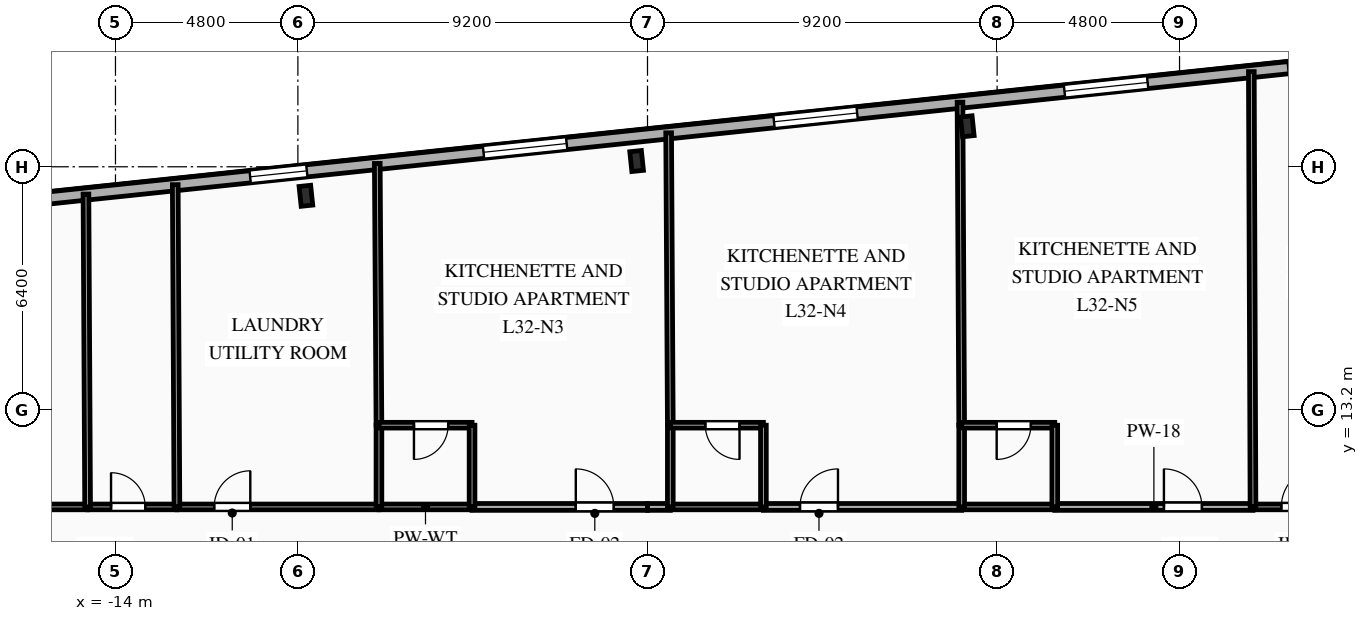
"""IFC4 building model, lengths in metres.
Left out: names, types, materials, properties, quantities, classifications, styles, units other than length and angle.
Written with IfcOpenShell. Run it as: python <this file> out.ifc"""

import sys

from ifc_helpers import new_model, si_unit, direction, frame, frame_2d, origin, origin_2d, place, context, subcontext, project, spatial, rectangle, i_section, extrude, element, fill, save


model = new_model("IFC4")
c1 = context("Model", 3, precision=1e-05, world=origin(), true_north=direction((0.0, 1.0)))
c2 = subcontext(c1, "Body", "Model", "MODEL_VIEW")
j1 = project(units=[si_unit("LENGTHUNIT", "METRE"), si_unit("PLANEANGLEUNIT", "RADIAN")], contexts=[c1])
p1 = place(None, origin())
s1 = spatial("IfcSite", under=j1, at=p1, CompositionType="ELEMENT")
p2 = place(p1, origin())
s2 = spatial("IfcBuilding", under=s1, at=p2, CompositionType="ELEMENT")
p3 = place(p2, frame((0.0, 0.0, 115.85)))
s3 = spatial("IfcBuildingStorey", under=s2, at=p3, CompositionType="ELEMENT", Elevation=115.85)
for number, where, z_axis, x_axis in (
    (1, (8.415, 20.666, 0.0), (0.0, 0.0, 1.0), (0.995, 0.105, 0.0)),
    (2, (-0.287, 19.751, 0.0), (0.0, 0.0, 1.0), (0.995, 0.105, 0.0)),
    (3, (-8.989, 18.836, 0.0), (0.0, 0.0, 1.0), (0.995, 0.105, 0.0)),
):
    element("IfcColumn", number, at=place(p3, frame(where, z_axis=z_axis, x_axis=x_axis)), inside=s3, PredefinedType="COLUMN", context=c2, shape_type="SweptSolid", body=[
        extrude(i_section(OverallWidth=0.306, OverallDepth=0.524, WebThickness=0.021, FlangeThickness=0.04, FilletRadius=0.027, at=origin_2d()), origin(), (0.0, 0.0, 1.0), 3.35),
    ])
p4 = place(p3, frame((-27.107, 17.586, 0.0), z_axis=(0.0, 0.0, 1.0), x_axis=(0.994521628355, 0.104531003701, 0.0)))
e4 = element("IfcWall", 4, at=p4, inside=s3, PredefinedType="SOLIDWALL", context=c2, shape_type="SweptSolid", body=[
    extrude(rectangle(XDim=53.8, YDim=0.32, at=frame_2d((26.9, 0.0))), origin(), (0.0, 0.0, 1.0), 3.045),
])
p5 = place(p4, frame((1.457, 0.0, 0.85)))
e5 = element("IfcOpeningElement", 5, at=p5, cuts=e4, PredefinedType="OPENING", context=c2, shape_type="SweptSolid", body=[
    extrude(rectangle(XDim=1.65, YDim=1.85, at=frame_2d((0.825, 0.925))), frame((0.0, 0.17, 0.0), z_axis=(0.0, -1.0, 0.0), x_axis=(1.0, 0.0, 0.0)), (0.0, 0.0, 1.0), 0.34),
])
p6 = place(p4, frame((7.421, 0.0, 0.85)))
e6 = element("IfcOpeningElement", 6, at=p6, cuts=e4, PredefinedType="OPENING", context=c2, shape_type="SweptSolid", body=[
    extrude(rectangle(XDim=1.65, YDim=1.85, at=frame_2d((0.825, 0.925))), frame((0.0, 0.17, 0.0), z_axis=(0.0, -1.0, 0.0), x_axis=(1.0, 0.0, 0.0)), (0.0, 0.0, 1.0), 0.34),
])
p7 = place(p4, frame((16.743, 0.0, 0.85)))
e7 = element("IfcOpeningElement", 7, at=p7, cuts=e4, PredefinedType="OPENING", context=c2, shape_type="SweptSolid", body=[
    extrude(rectangle(XDim=1.5, YDim=1.85, at=frame_2d((0.75, 0.925))), frame((0.0, 0.17, 0.0), z_axis=(0.0, -1.0, 0.0), x_axis=(1.0, 0.0, 0.0)), (0.0, 0.0, 1.0), 0.34),
])
p8 = place(p4, frame((22.918, 0.0, 0.85)))
e8 = element("IfcOpeningElement", 8, at=p8, cuts=e4, PredefinedType="OPENING", context=c2, shape_type="SweptSolid", body=[
    extrude(rectangle(XDim=2.2, YDim=1.85, at=frame_2d((1.1, 0.925))), frame((0.0, 0.17, 0.0), z_axis=(0.0, -1.0, 0.0), x_axis=(1.0, 0.0, 0.0)), (0.0, 0.0, 1.0), 0.34),
])
p9 = place(p4, frame((30.604, 0.0, 0.85)))
e9 = element("IfcOpeningElement", 9, at=p9, cuts=e4, PredefinedType="OPENING", context=c2, shape_type="SweptSolid", body=[
    extrude(rectangle(XDim=2.2, YDim=1.85, at=frame_2d((1.1, 0.925))), frame((0.0, 0.17, 0.0), z_axis=(0.0, -1.0, 0.0), x_axis=(1.0, 0.0, 0.0)), (0.0, 0.0, 1.0), 0.34),
])
p10 = place(p4, frame((38.289, 0.0, 0.85)))
e10 = element("IfcOpeningElement", 10, at=p10, cuts=e4, PredefinedType="OPENING", context=c2, shape_type="SweptSolid", body=[
    extrude(rectangle(XDim=2.2, YDim=1.85, at=frame_2d((1.1, 0.925))), frame((0.0, 0.17, 0.0), z_axis=(0.0, -1.0, 0.0), x_axis=(1.0, 0.0, 0.0)), (0.0, 0.0, 1.0), 0.34),
])
p11 = place(p4, frame((44.208, 0.0, 0.85)))
e11 = element("IfcOpeningElement", 11, at=p11, cuts=e4, PredefinedType="OPENING", context=c2, shape_type="SweptSolid", body=[
    extrude(rectangle(XDim=1.65, YDim=1.85, at=frame_2d((0.825, 0.925))), frame((0.0, 0.17, 0.0), z_axis=(0.0, -1.0, 0.0), x_axis=(1.0, 0.0, 0.0)), (0.0, 0.0, 1.0), 0.34),
])
p12 = place(p4, frame((47.771, 0.0, 0.85)))
e12 = element("IfcOpeningElement", 12, at=p12, cuts=e4, PredefinedType="OPENING", context=c2, shape_type="SweptSolid", body=[
    extrude(rectangle(XDim=1.65, YDim=1.85, at=frame_2d((0.825, 0.925))), frame((0.0, 0.17, 0.0), z_axis=(0.0, -1.0, 0.0), x_axis=(1.0, 0.0, 0.0)), (0.0, 0.0, 1.0), 0.34),
])
p13 = place(p4, frame((51.129, 0.0, 0.85)))
e13 = element("IfcOpeningElement", 13, at=p13, cuts=e4, PredefinedType="OPENING", context=c2, shape_type="SweptSolid", body=[
    extrude(rectangle(XDim=1.5, YDim=1.85, at=frame_2d((0.75, 0.925))), frame((0.0, 0.17, 0.0), z_axis=(0.0, -1.0, 0.0), x_axis=(1.0, 0.0, 0.0)), (0.0, 0.0, 1.0), 0.34),
])
p14 = place(p3, frame((-23.0, 10.65, 0.0), z_axis=(0.0, 0.0, 1.0), x_axis=(1.0, 0.0, 0.0)))
e14 = element("IfcWall", 14, at=p14, inside=s3, PredefinedType="PARTITIONING", context=c2, shape_type="SweptSolid", body=[
    extrude(rectangle(XDim=8.267, YDim=0.15, at=frame_2d((4.134, 0.0))), origin(), (0.0, 0.0, 1.0), 3.045),
])
p15 = place(p14, frame((1.337, 0.0, 0.0)))
e15 = element("IfcOpeningElement", 15, at=p15, cuts=e14, PredefinedType="OPENING", context=c2, shape_type="SweptSolid", body=[
    extrude(rectangle(XDim=1.05, YDim=2.15, at=frame_2d((0.525, 1.075))), frame((0.0, 0.085, 0.0), z_axis=(0.0, -1.0, 0.0), x_axis=(1.0, 0.0, 0.0)), (0.0, 0.0, 1.0), 0.17),
])
p16 = place(p3, frame((-14.733, 10.65, 0.0), z_axis=(0.0, 0.0, 1.0), x_axis=(1.0, 0.0, 0.0)))
e16 = element("IfcWall", 16, at=p16, inside=s3, PredefinedType="PLUMBINGWALL", context=c2, shape_type="SweptSolid", body=[
    extrude(rectangle(XDim=2.35, YDim=0.15, at=frame_2d((1.175, 0.0))), origin(), (0.0, 0.0, 1.0), 3.045),
])
p17 = place(p16, frame((0.616, 0.0, 0.0)))
e17 = element("IfcOpeningElement", 17, at=p17, cuts=e16, PredefinedType="OPENING", context=c2, shape_type="SweptSolid", body=[
    extrude(rectangle(XDim=0.9, YDim=2.1, at=frame_2d((0.45, 1.05))), frame((0.0, 0.085, 0.0), z_axis=(0.0, -1.0, 0.0), x_axis=(1.0, 0.0, 0.0)), (0.0, 0.0, 1.0), 0.17),
])
p18 = place(p3, frame((-12.383, 10.65, 0.0), z_axis=(0.0, 0.0, 1.0), x_axis=(1.0, 0.0, 0.0)))
e18 = element("IfcWall", 18, at=p18, inside=s3, PredefinedType="PARTITIONING", context=c2, shape_type="SweptSolid", body=[
    extrude(rectangle(XDim=5.316, YDim=0.15, at=frame_2d((2.658, 0.0))), origin(), (0.0, 0.0, 1.0), 3.045),
])
p19 = place(p18, frame((0.981, 0.0, 0.0)))
e19 = element("IfcOpeningElement", 19, at=p19, cuts=e18, PredefinedType="OPENING", context=c2, shape_type="SweptSolid", body=[
    extrude(rectangle(XDim=0.95, YDim=2.1, at=frame_2d((0.475, 1.05))), frame((0.0, 0.085, 0.0), z_axis=(0.0, -1.0, 0.0), x_axis=(1.0, 0.0, 0.0)), (0.0, 0.0, 1.0), 0.17),
])
p20 = place(p3, frame((-4.617, 10.65, 0.0), z_axis=(0.0, 0.0, 1.0), x_axis=(1.0, 0.0, 0.0)))
e20 = element("IfcWall", 20, at=p20, inside=s3, PredefinedType="PARTITIONING", context=c2, shape_type="SweptSolid", body=[
    extrude(rectangle(XDim=4.617, YDim=0.18, at=frame_2d((2.309, 0.0))), origin(), (0.0, 0.0, 1.0), 3.045),
])
p21 = place(p20, frame((2.73, 0.0, 0.0)))
e21 = element("IfcOpeningElement", 21, at=p21, cuts=e20, PredefinedType="OPENING", context=c2, shape_type="SweptSolid", body=[
    extrude(rectangle(XDim=1.0, YDim=2.15, at=frame_2d((0.5, 1.075))), frame((0.0, 0.1, 0.0), z_axis=(0.0, -1.0, 0.0), x_axis=(1.0, 0.0, 0.0)), (0.0, 0.0, 1.0), 0.2),
])
p22 = place(p3, frame((-7.067, 10.65, 0.0), z_axis=(0.0, 0.0, 1.0), x_axis=(1.0, 0.0, 0.0)))
e22 = element("IfcWall", 22, at=p22, inside=s3, PredefinedType="PLUMBINGWALL", context=c2, shape_type="SweptSolid", body=[
    extrude(rectangle(XDim=2.45, YDim=0.15, at=frame_2d((1.225, 0.0))), origin(), (0.0, 0.0, 1.0), 3.045),
])
p23 = place(p3, frame((0.0, 10.65, 0.0), z_axis=(0.0, 0.0, 1.0), x_axis=(1.0, 0.0, 0.0)))
e23 = element("IfcWall", 23, at=p23, inside=s3, PredefinedType="PARTITIONING", context=c2, shape_type="SweptSolid", body=[
    extrude(rectangle(XDim=0.6, YDim=0.18, at=frame_2d((0.3, 0.0))), origin(), (0.0, 0.0, 1.0), 3.045),
])
p24 = place(p3, frame((3.05, 10.65, 0.0), z_axis=(0.0, 0.0, 1.0), x_axis=(1.0, 0.0, 0.0)))
e24 = element("IfcWall", 24, at=p24, inside=s3, PredefinedType="PARTITIONING", context=c2, shape_type="SweptSolid", body=[
    extrude(rectangle(XDim=5.217, YDim=0.18, at=frame_2d((2.608, 0.0))), origin(), (0.0, 0.0, 1.0), 3.045),
])
p25 = place(p24, frame((0.962, 0.0, 0.0)))
e25 = element("IfcOpeningElement", 25, at=p25, cuts=e24, PredefinedType="OPENING", context=c2, shape_type="SweptSolid", body=[
    extrude(rectangle(XDim=1.0, YDim=2.15, at=frame_2d((0.5, 1.075))), frame((0.0, 0.1, 0.0), z_axis=(0.0, -1.0, 0.0), x_axis=(1.0, 0.0, 0.0)), (0.0, 0.0, 1.0), 0.2),
])
p26 = place(p3, frame((0.6, 10.65, 0.0), z_axis=(0.0, 0.0, 1.0), x_axis=(1.0, 0.0, 0.0)))
e26 = element("IfcWall", 26, at=p26, inside=s3, PredefinedType="PLUMBINGWALL", context=c2, shape_type="SweptSolid", body=[
    extrude(rectangle(XDim=2.45, YDim=0.15, at=frame_2d((1.225, 0.0))), origin(), (0.0, 0.0, 1.0), 3.045),
])
p27 = place(p3, frame((10.717, 10.65, 0.0), z_axis=(0.0, 0.0, 1.0), x_axis=(1.0, 0.0, 0.0)))
e27 = element("IfcWall", 27, at=p27, inside=s3, PredefinedType="PARTITIONING", context=c2, shape_type="SweptSolid", body=[
    extrude(rectangle(XDim=5.216, YDim=0.18, at=frame_2d((2.608, 0.0))), origin(), (0.0, 0.0, 1.0), 3.045),
])
p28 = place(p27, frame((2.872, 0.0, 0.0)))
e28 = element("IfcOpeningElement", 28, at=p28, cuts=e27, PredefinedType="OPENING", context=c2, shape_type="SweptSolid", body=[
    extrude(rectangle(XDim=1.0, YDim=2.15, at=frame_2d((0.5, 1.075))), frame((0.0, 0.1, 0.0), z_axis=(0.0, -1.0, 0.0), x_axis=(1.0, 0.0, 0.0)), (0.0, 0.0, 1.0), 0.2),
])
p29 = place(p3, frame((8.267, 10.65, 0.0), z_axis=(0.0, 0.0, 1.0), x_axis=(1.0, 0.0, 0.0)))
e29 = element("IfcWall", 29, at=p29, inside=s3, PredefinedType="PLUMBINGWALL", context=c2, shape_type="SweptSolid", body=[
    extrude(rectangle(XDim=2.45, YDim=0.15, at=frame_2d((1.225, 0.0))), origin(), (0.0, 0.0, 1.0), 3.045),
])
p30 = place(p3, frame((15.933, 10.65, 0.0), z_axis=(0.0, 0.0, 1.0), x_axis=(1.0, 0.0, 0.0)))
e30 = element("IfcWall", 30, at=p30, inside=s3, PredefinedType="PARTITIONING", context=c2, shape_type="SweptSolid", body=[
    extrude(rectangle(XDim=3.533, YDim=0.15, at=frame_2d((1.767, 0.0))), origin(), (0.0, 0.0, 1.0), 3.045),
])
p31 = place(p30, frame((0.745, 0.0, 0.0)))
e31 = element("IfcOpeningElement", 31, at=p31, cuts=e30, PredefinedType="OPENING", context=c2, shape_type="SweptSolid", body=[
    extrude(rectangle(XDim=1.05, YDim=2.15, at=frame_2d((0.525, 1.075))), frame((0.0, 0.085, 0.0), z_axis=(0.0, -1.0, 0.0), x_axis=(1.0, 0.0, 0.0)), (0.0, 0.0, 1.0), 0.17),
])
p32 = place(p3, frame((-14.777, 18.882, 0.0), z_axis=(0.0, 0.0, 1.0), x_axis=(0.005338477179, -0.999985750229, 0.0)))
e32 = element("IfcWall", 32, at=p32, inside=s3, PredefinedType="PLUMBINGWALL", context=c2, shape_type="SweptSolid", body=[
    extrude(rectangle(XDim=8.232, YDim=0.15, at=frame_2d((4.116, 0.0))), origin(), (0.0, 0.0, 1.0), 3.045),
])
p33 = place(p3, frame((-12.427, 19.129, 0.0), z_axis=(0.0, 0.0, 1.0), x_axis=(0.005182918666, -0.999986568587, 0.0)))
e33 = element("IfcWall", 33, at=p33, inside=s3, PredefinedType="PLUMBINGWALL", context=c2, shape_type="SweptSolid", body=[
    extrude(rectangle(XDim=8.479, YDim=0.15, at=frame_2d((4.239, 0.0))), origin(), (0.0, 0.0, 1.0), 3.045),
])
p34 = place(p3, frame((-7.111, 19.688, 0.0), z_axis=(0.0, 0.0, 1.0), x_axis=(0.006380360007, -0.999979645296, 0.0)))
e34 = element("IfcWall", 34, at=p34, inside=s3, PredefinedType="PARTITIONING", context=c2, shape_type="SweptSolid", body=[
    extrude(rectangle(XDim=6.888, YDim=0.15, at=frame_2d((3.444, 0.0))), origin(), (0.0, 0.0, 1.0), 3.045),
])
p35 = place(p3, frame((-7.067, 12.8, 0.0), z_axis=(0.0, 0.0, 1.0), x_axis=(0.0, -1.0, 0.0)))
e35 = element("IfcWall", 35, at=p35, inside=s3, PredefinedType="PLUMBINGWALL", context=c2, shape_type="SweptSolid", body=[
    extrude(rectangle(XDim=2.15, YDim=0.15, at=frame_2d((1.075, 0.0))), origin(), (0.0, 0.0, 1.0), 3.045),
])
p36 = place(p3, frame((-4.617, 12.8, 0.0), z_axis=(0.0, 0.0, 1.0), x_axis=(-1.0, 0.0, 0.0)))
e36 = element("IfcWall", 36, at=p36, inside=s3, PredefinedType="PLUMBINGWALL", context=c2, shape_type="SweptSolid", body=[
    extrude(rectangle(XDim=2.45, YDim=0.15, at=frame_2d((1.225, 0.0))), origin(), (0.0, 0.0, 1.0), 3.045),
])
p37 = place(p36, frame((0.629, 0.0, 0.0)))
e37 = element("IfcOpeningElement", 37, at=p37, cuts=e36, PredefinedType="OPENING", context=c2, shape_type="SweptSolid", body=[
    extrude(rectangle(XDim=0.9, YDim=2.1, at=frame_2d((0.45, 1.05))), frame((0.0, 0.085, 0.0), z_axis=(0.0, -1.0, 0.0), x_axis=(1.0, 0.0, 0.0)), (0.0, 0.0, 1.0), 0.17),
])
p38 = place(p3, frame((-4.617, 10.65, 0.0), z_axis=(0.0, 0.0, 1.0), x_axis=(0.0, 1.0, 0.0)))
e38 = element("IfcWall", 38, at=p38, inside=s3, PredefinedType="PLUMBINGWALL", context=c2, shape_type="SweptSolid", body=[
    extrude(rectangle(XDim=2.15, YDim=0.15, at=frame_2d((1.075, 0.0))), origin(), (0.0, 0.0, 1.0), 3.045),
])
p39 = place(p3, frame((0.556, 20.493, 0.0), z_axis=(0.0, 0.0, 1.0), x_axis=(0.005712016487, -0.999983686301, 0.0)))
e39 = element("IfcWall", 39, at=p39, inside=s3, PredefinedType="PARTITIONING", context=c2, shape_type="SweptSolid", body=[
    extrude(rectangle(XDim=7.694, YDim=0.15, at=frame_2d((3.847, 0.0))), origin(), (0.0, 0.0, 1.0), 3.045),
])
p40 = place(p3, frame((0.6, 12.8, 0.0), z_axis=(0.0, 0.0, 1.0), x_axis=(0.0, -1.0, 0.0)))
e40 = element("IfcWall", 40, at=p40, inside=s3, PredefinedType="PLUMBINGWALL", context=c2, shape_type="SweptSolid", body=[
    extrude(rectangle(XDim=2.15, YDim=0.15, at=frame_2d((1.075, 0.0))), origin(), (0.0, 0.0, 1.0), 3.045),
])
p41 = place(p3, frame((3.05, 12.8, 0.0), z_axis=(0.0, 0.0, 1.0), x_axis=(-1.0, 0.0, 0.0)))
e41 = element("IfcWall", 41, at=p41, inside=s3, PredefinedType="PLUMBINGWALL", context=c2, shape_type="SweptSolid", body=[
    extrude(rectangle(XDim=2.45, YDim=0.15, at=frame_2d((1.225, 0.0))), origin(), (0.0, 0.0, 1.0), 3.045),
])
p42 = place(p41, frame((0.629, 0.0, 0.0)))
e42 = element("IfcOpeningElement", 42, at=p42, cuts=e41, PredefinedType="OPENING", context=c2, shape_type="SweptSolid", body=[
    extrude(rectangle(XDim=0.9, YDim=2.1, at=frame_2d((0.45, 1.05))), frame((0.0, 0.085, 0.0), z_axis=(0.0, -1.0, 0.0), x_axis=(1.0, 0.0, 0.0)), (0.0, 0.0, 1.0), 0.17),
])
p43 = place(p3, frame((3.05, 10.65, 0.0), z_axis=(0.0, 0.0, 1.0), x_axis=(0.0, 1.0, 0.0)))
e43 = element("IfcWall", 43, at=p43, inside=s3, PredefinedType="PLUMBINGWALL", context=c2, shape_type="SweptSolid", body=[
    extrude(rectangle(XDim=2.15, YDim=0.15, at=frame_2d((1.075, 0.0))), origin(), (0.0, 0.0, 1.0), 3.045),
])
p44 = place(p3, frame((8.223, 21.299, 0.0), z_axis=(0.0, 0.0, 1.0), x_axis=(0.005170561699, -0.999986632557, 0.0)))
e44 = element("IfcWall", 44, at=p44, inside=s3, PredefinedType="PARTITIONING", context=c2, shape_type="SweptSolid", body=[
    extrude(rectangle(XDim=8.499, YDim=0.15, at=frame_2d((4.25, 0.0))), origin(), (0.0, 0.0, 1.0), 2.53),
])
p45 = place(p3, frame((8.267, 12.8, 0.0), z_axis=(0.0, 0.0, 1.0), x_axis=(0.0, -1.0, 0.0)))
e45 = element("IfcWall", 45, at=p45, inside=s3, PredefinedType="PLUMBINGWALL", context=c2, shape_type="SweptSolid", body=[
    extrude(rectangle(XDim=2.15, YDim=0.15, at=frame_2d((1.075, 0.0))), origin(), (0.0, 0.0, 1.0), 3.045),
])
p46 = place(p3, frame((10.717, 12.8, 0.0), z_axis=(0.0, 0.0, 1.0), x_axis=(-1.0, 0.0, 0.0)))
e46 = element("IfcWall", 46, at=p46, inside=s3, PredefinedType="PLUMBINGWALL", context=c2, shape_type="SweptSolid", body=[
    extrude(rectangle(XDim=2.45, YDim=0.15, at=frame_2d((1.225, 0.0))), origin(), (0.0, 0.0, 1.0), 3.045),
])
p47 = place(p46, frame((0.629, 0.0, 0.0)))
e47 = element("IfcOpeningElement", 47, at=p47, cuts=e46, PredefinedType="OPENING", context=c2, shape_type="SweptSolid", body=[
    extrude(rectangle(XDim=0.9, YDim=2.1, at=frame_2d((0.45, 1.05))), frame((0.0, 0.085, 0.0), z_axis=(0.0, -1.0, 0.0), x_axis=(1.0, 0.0, 0.0)), (0.0, 0.0, 1.0), 0.17),
])
p48 = place(p3, frame((10.717, 10.65, 0.0), z_axis=(0.0, 0.0, 1.0), x_axis=(0.0, 1.0, 0.0)))
e48 = element("IfcWall", 48, at=p48, inside=s3, PredefinedType="PLUMBINGWALL", context=c2, shape_type="SweptSolid", body=[
    extrude(rectangle(XDim=2.15, YDim=0.15, at=frame_2d((1.075, 0.0))), origin(), (0.0, 0.0, 1.0), 3.045),
])
p49 = place(p3, frame((15.889, 22.105, 0.0), z_axis=(0.0, 0.0, 1.0), x_axis=(0.003836370669, -0.999992641103, 0.0)))
e49 = element("IfcWall", 49, at=p49, inside=s3, PredefinedType="PARTITIONING", context=c2, shape_type="SweptSolid", body=[
    extrude(rectangle(XDim=11.455, YDim=0.15, at=frame_2d((5.728, 0.0))), origin(), (0.0, 0.0, 1.0), 3.045),
])
p50 = place(p7, origin())
e50 = element("IfcWindow", 50, at=p50, inside=s3, PartitioningType="SINGLE_PANEL", PredefinedType="WINDOW", context=c2, shape_type="SweptSolid", body=[
    extrude(rectangle(XDim=1.5, YDim=1.85, at=frame_2d((0.75, 0.925))), frame((0.0, 0.03, 0.0), z_axis=(0.0, -1.0, 0.0), x_axis=(1.0, 0.0, 0.0)), (0.0, 0.0, 1.0), 0.06),
])
fill(e7, e50)
p51 = place(p8, origin())
e51 = element("IfcWindow", 51, at=p51, inside=s3, PartitioningType="SINGLE_PANEL", PredefinedType="WINDOW", context=c2, shape_type="SweptSolid", body=[
    extrude(rectangle(XDim=2.2, YDim=1.85, at=frame_2d((1.1, 0.925))), frame((0.0, 0.03, 0.0), z_axis=(0.0, -1.0, 0.0), x_axis=(1.0, 0.0, 0.0)), (0.0, 0.0, 1.0), 0.06),
])
fill(e8, e51)
p52 = place(p9, origin())
e52 = element("IfcWindow", 52, at=p52, inside=s3, PartitioningType="SINGLE_PANEL", PredefinedType="WINDOW", context=c2, shape_type="SweptSolid", body=[
    extrude(rectangle(XDim=2.2, YDim=1.85, at=frame_2d((1.1, 0.925))), frame((0.0, 0.03, 0.0), z_axis=(0.0, -1.0, 0.0), x_axis=(1.0, 0.0, 0.0)), (0.0, 0.0, 1.0), 0.06),
])
fill(e9, e52)
p53 = place(p10, origin())
e53 = element("IfcWindow", 53, at=p53, inside=s3, PartitioningType="SINGLE_PANEL", PredefinedType="WINDOW", context=c2, shape_type="SweptSolid", body=[
    extrude(rectangle(XDim=2.2, YDim=1.85, at=frame_2d((1.1, 0.925))), frame((0.0, 0.03, 0.0), z_axis=(0.0, -1.0, 0.0), x_axis=(1.0, 0.0, 0.0)), (0.0, 0.0, 1.0), 0.06),
])
fill(e10, e53)
p54 = place(p11, origin())
e54 = element("IfcWindow", 54, at=p54, inside=s3, PartitioningType="SINGLE_PANEL", PredefinedType="WINDOW", context=c2, shape_type="SweptSolid", body=[
    extrude(rectangle(XDim=1.65, YDim=1.85, at=frame_2d((0.825, 0.925))), frame((0.0, 0.03, 0.0), z_axis=(0.0, -1.0, 0.0), x_axis=(1.0, 0.0, 0.0)), (0.0, 0.0, 1.0), 0.06),
])
fill(e11, e54)
p55 = place(p17, origin())
e55 = element("IfcDoor", 55, at=p55, inside=s3, OperationType="SINGLE_SWING_LEFT", PredefinedType="DOOR", context=c2, shape_type="SweptSolid", body=[
    extrude(rectangle(XDim=0.9, YDim=2.1, at=frame_2d((0.45, 1.05))), frame((0.0, 0.025, 0.0), z_axis=(0.0, -1.0, 0.0), x_axis=(1.0, 0.0, 0.0)), (0.0, 0.0, 1.0), 0.05),
])
fill(e17, e55)
p56 = place(p19, origin())
e56 = element("IfcDoor", 56, at=p56, inside=s3, OperationType="SINGLE_SWING_RIGHT", PredefinedType="DOOR", context=c2, shape_type="SweptSolid", body=[
    extrude(rectangle(XDim=0.95, YDim=2.1, at=frame_2d((0.475, 1.05))), frame((0.0, 0.025, 0.0), z_axis=(0.0, -1.0, 0.0), x_axis=(1.0, 0.0, 0.0)), (0.0, 0.0, 1.0), 0.05),
])
fill(e19, e56)
p57 = place(p21, origin())
e57 = element("IfcDoor", 57, at=p57, inside=s3, OperationType="SINGLE_SWING_LEFT", PredefinedType="DOOR", context=c2, shape_type="SweptSolid", body=[
    extrude(rectangle(XDim=1.0, YDim=2.15, at=frame_2d((0.5, 1.075))), frame((0.0, 0.025, 0.0), z_axis=(0.0, -1.0, 0.0), x_axis=(1.0, 0.0, 0.0)), (0.0, 0.0, 1.0), 0.05),
])
fill(e21, e57)
p58 = place(p25, origin())
e58 = element("IfcDoor", 58, at=p58, inside=s3, OperationType="SINGLE_SWING_RIGHT", PredefinedType="DOOR", context=c2, shape_type="SweptSolid", body=[
    extrude(rectangle(XDim=1.0, YDim=2.15, at=frame_2d((0.5, 1.075))), frame((0.0, 0.025, 0.0), z_axis=(0.0, -1.0, 0.0), x_axis=(1.0, 0.0, 0.0)), (0.0, 0.0, 1.0), 0.05),
])
fill(e25, e58)
p59 = place(p28, origin())
e59 = element("IfcDoor", 59, at=p59, inside=s3, OperationType="SINGLE_SWING_LEFT", PredefinedType="DOOR", context=c2, shape_type="SweptSolid", body=[
    extrude(rectangle(XDim=1.0, YDim=2.15, at=frame_2d((0.5, 1.075))), frame((0.0, 0.025, 0.0), z_axis=(0.0, -1.0, 0.0), x_axis=(1.0, 0.0, 0.0)), (0.0, 0.0, 1.0), 0.05),
])
fill(e28, e59)
p60 = place(p31, origin())
e60 = element("IfcDoor", 60, at=p60, inside=s3, OperationType="SINGLE_SWING_RIGHT", PredefinedType="DOOR", context=c2, shape_type="SweptSolid", body=[
    extrude(rectangle(XDim=1.05, YDim=2.15, at=frame_2d((0.525, 1.075))), frame((0.0, 0.025, 0.0), z_axis=(0.0, -1.0, 0.0), x_axis=(1.0, 0.0, 0.0)), (0.0, 0.0, 1.0), 0.05),
])
fill(e31, e60)
p61 = place(p37, origin())
e61 = element("IfcDoor", 61, at=p61, inside=s3, OperationType="SINGLE_SWING_RIGHT", PredefinedType="DOOR", context=c2, shape_type="SweptSolid", body=[
    extrude(rectangle(XDim=0.9, YDim=2.1, at=frame_2d((0.45, 1.05))), frame((0.0, 0.025, 0.0), z_axis=(0.0, -1.0, 0.0), x_axis=(1.0, 0.0, 0.0)), (0.0, 0.0, 1.0), 0.05),
])
fill(e37, e61)
p62 = place(p42, origin())
e62 = element("IfcDoor", 62, at=p62, inside=s3, OperationType="SINGLE_SWING_LEFT", PredefinedType="DOOR", context=c2, shape_type="SweptSolid", body=[
    extrude(rectangle(XDim=0.9, YDim=2.1, at=frame_2d((0.45, 1.05))), frame((0.0, 0.025, 0.0), z_axis=(0.0, -1.0, 0.0), x_axis=(1.0, 0.0, 0.0)), (0.0, 0.0, 1.0), 0.05),
])
fill(e42, e62)
p63 = place(p47, origin())
e63 = element("IfcDoor", 63, at=p63, inside=s3, OperationType="SINGLE_SWING_RIGHT", PredefinedType="DOOR", context=c2, shape_type="SweptSolid", body=[
    extrude(rectangle(XDim=0.9, YDim=2.1, at=frame_2d((0.45, 1.05))), frame((0.0, 0.025, 0.0), z_axis=(0.0, -1.0, 0.0), x_axis=(1.0, 0.0, 0.0)), (0.0, 0.0, 1.0), 0.05),
])
fill(e47, e63)
save(model, sys.argv[1])
